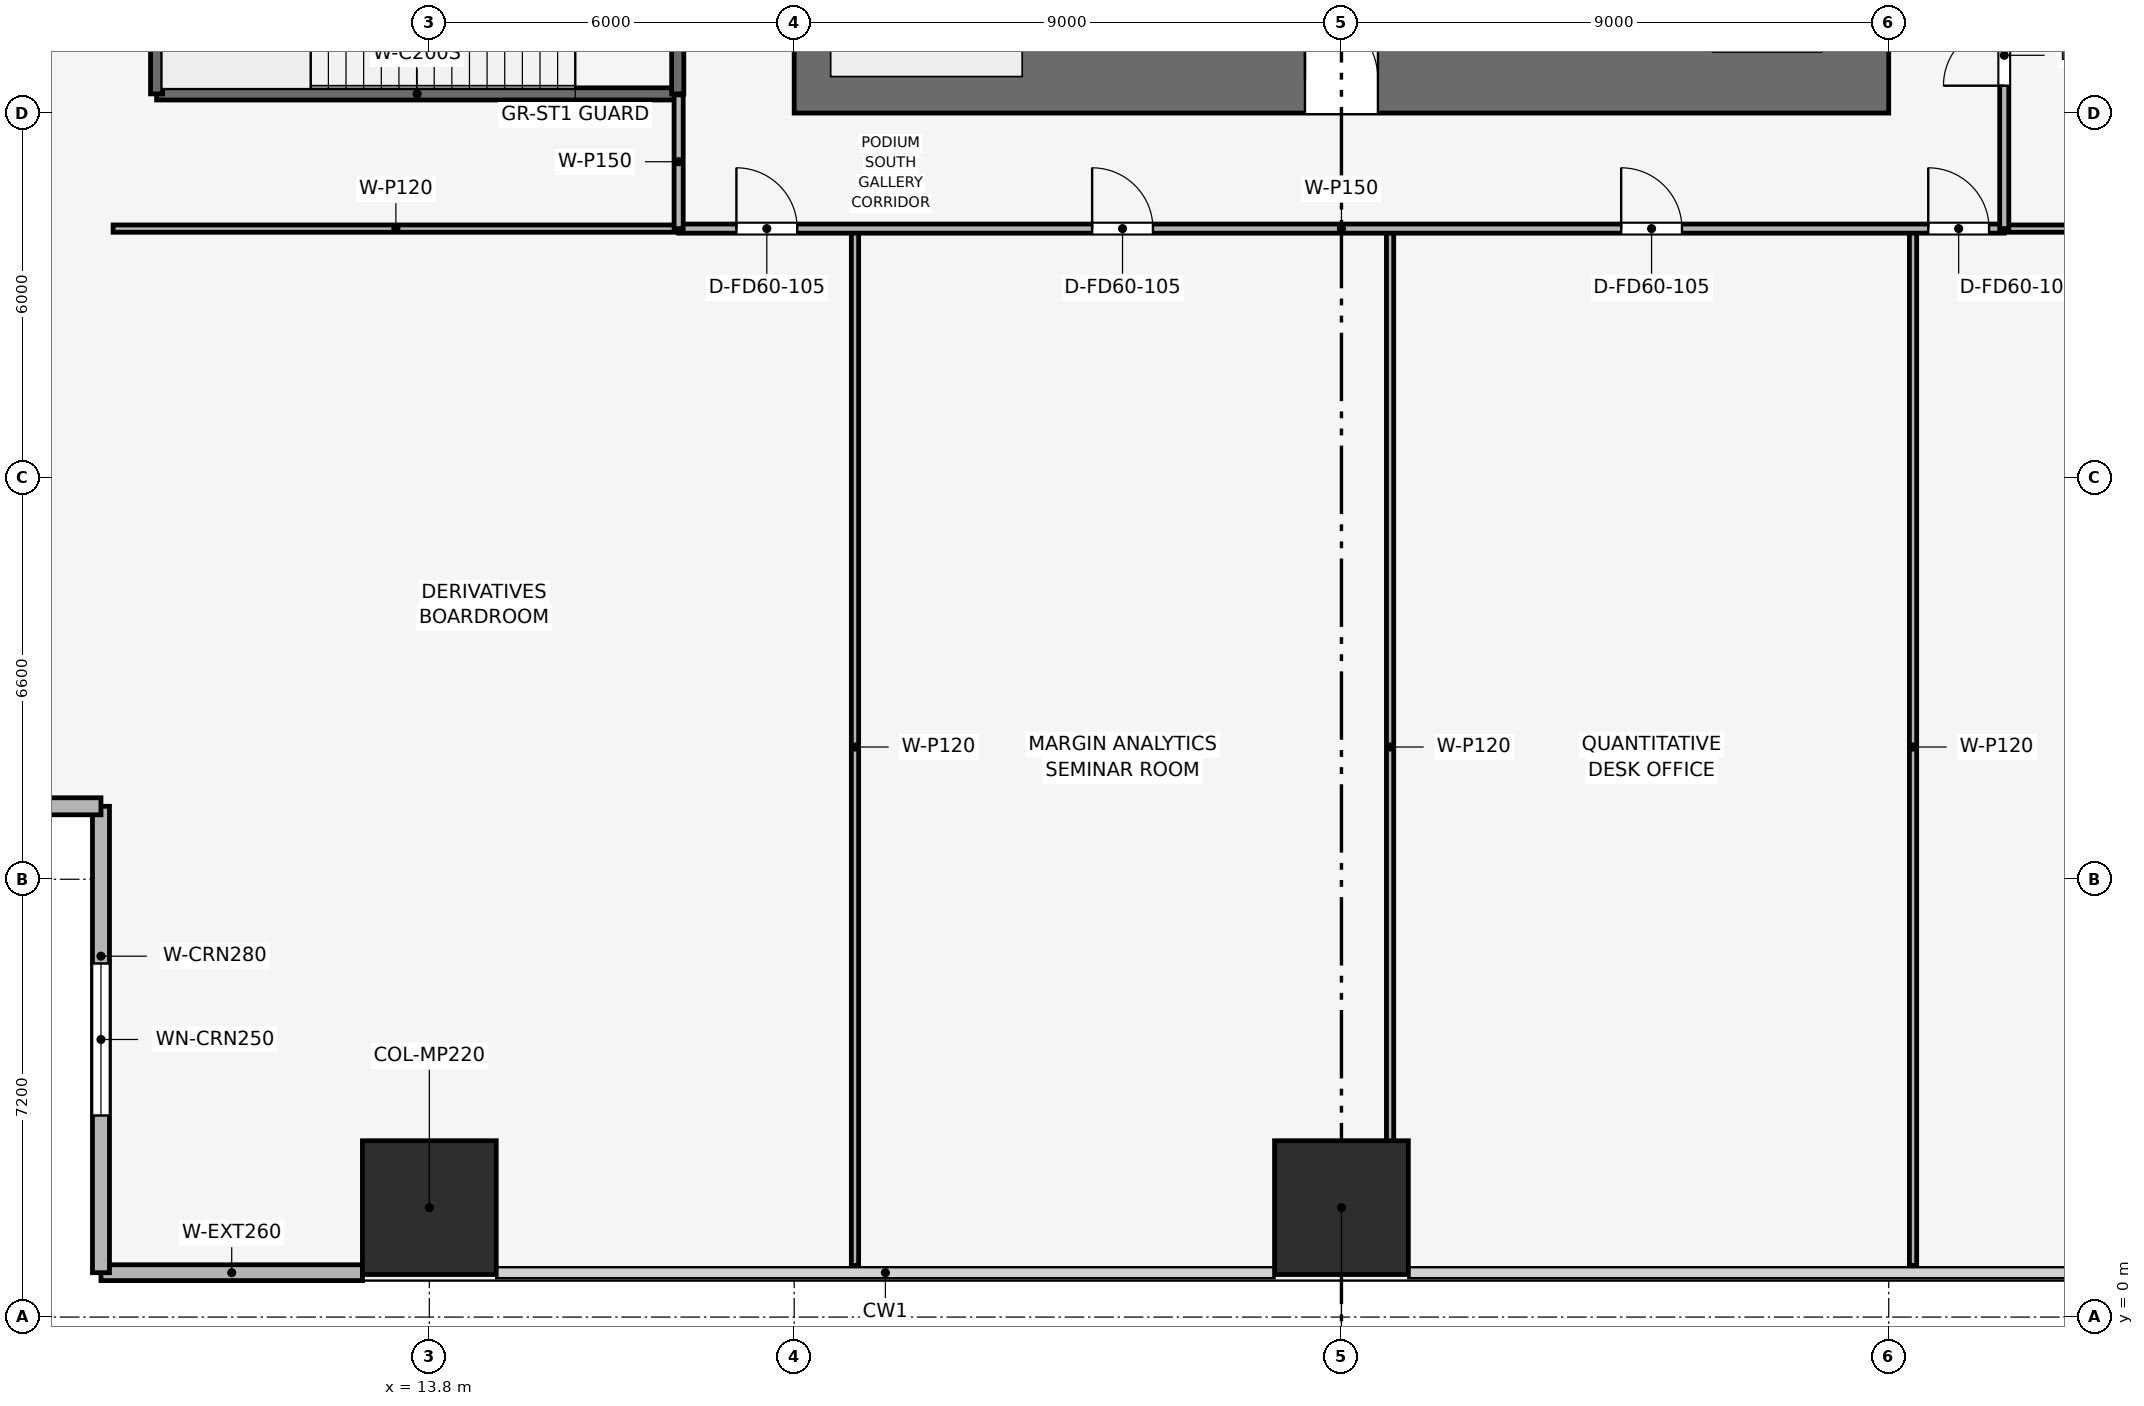
"""IFC4 building model, lengths in metres.
Left out: names, types, materials, properties, quantities, classifications, styles, units other than length and angle.
Written with IfcOpenShell. Run it as: python <this file> out.ifc"""

import sys

from ifc_helpers import new_model, si_unit, direction, frame, frame_2d, origin, origin_2d, place, context, subcontext, project, spatial, rectangle, extrude, element, fill, save


model = new_model("IFC4")
c1 = context("Model", 3, precision=1e-05, world=origin(), true_north=direction((0.0, 1.0)))
c2 = subcontext(c1, "Body", "Model", "MODEL_VIEW")
j1 = project(units=[si_unit("LENGTHUNIT", "METRE"), si_unit("PLANEANGLEUNIT", "RADIAN")], contexts=[c1])
p1 = place(None, origin())
s1 = spatial("IfcSite", under=j1, at=p1, CompositionType="ELEMENT")
p2 = place(p1, origin())
s2 = spatial("IfcBuilding", under=s1, at=p2, CompositionType="ELEMENT")
p3 = place(p2, frame((0.0, 0.0, 13.8)))
s3 = spatial("IfcBuildingStorey", under=s2, at=p3, CompositionType="ELEMENT", Elevation=13.8)
p4 = place(p3, frame((19.8, 20.35, 0.0), z_axis=(0.0, 0.0, 1.0), x_axis=(1.0, 0.0, 0.0)))
e1 = element("IfcWall", 1, at=p4, inside=s3, PredefinedType="SHEAR", context=c2, shape_type="SweptSolid", body=[
    extrude(rectangle(XDim=18.0, YDim=1.1, at=frame_2d((9.0, 0.0))), origin(), (0.0, 0.0, 1.0), 5.4),
])
p5 = place(p4, frame((8.4, 0.0, 0.0)))
e2 = element("IfcOpeningElement", 2, at=p5, cuts=e1, PredefinedType="OPENING", context=c2, shape_type="SweptSolid", body=[
    extrude(rectangle(XDim=1.2, YDim=2.2, at=frame_2d((0.6, 1.1))), frame((0.0, 0.56, 0.0), z_axis=(0.0, -1.0, 0.0), x_axis=(1.0, 0.0, 0.0)), (0.0, 0.0, 1.0), 1.12),
])
for number, where, z_axis, x_axis in (
    (3, (13.8, 1.8, 0.002), (0.0, 0.0, 1.0), (1.0, 0.0, 0.0)),
    (4, (28.8, 1.8, 0.002), (0.0, 0.0, 1.0), (1.0, 0.0, 0.0)),
):
    element("IfcColumn", number, at=place(p3, frame(where, z_axis=z_axis, x_axis=x_axis)), inside=s3, PredefinedType="PILASTER", context=c2, shape_type="SweptSolid", body=[
        extrude(rectangle(XDim=2.2, YDim=2.2, at=origin_2d()), origin(), (0.0, 0.0, 1.0), 5.396),
    ])
p6 = place(p3, frame((12.7, 0.73, 0.0), z_axis=(0.0, 0.0, 1.0), x_axis=(-1.0, 0.0, 0.0)))
e5 = element("IfcWall", 5, at=p6, inside=s3, PredefinedType="SOLIDWALL", context=c2, shape_type="SweptSolid", body=[
    extrude(rectangle(XDim=4.3, YDim=0.26, at=frame_2d((2.15, 0.0))), origin(), (0.0, 0.0, 1.0), 5.05),
])
p7 = place(p3, frame((8.4, 0.73, 0.0), z_axis=(0.0, 0.0, 1.0), x_axis=(0.0, 1.0, 0.0)))
e6 = element("IfcWall", 6, at=p7, inside=s3, PredefinedType="SOLIDWALL", context=c2, shape_type="SweptSolid", body=[
    extrude(rectangle(XDim=7.67, YDim=0.28, at=frame_2d((3.835, 0.0))), origin(), (0.0, 0.0, 1.0), 5.05),
])
p8 = place(p7, frame((2.585, 0.0, 0.9)))
e7 = element("IfcOpeningElement", 7, at=p8, cuts=e6, PredefinedType="OPENING", context=c2, shape_type="SweptSolid", body=[
    extrude(rectangle(XDim=2.5, YDim=1.9, at=frame_2d((1.25, 0.95))), frame((0.0, 0.15, 0.0), z_axis=(0.0, -1.0, 0.0), x_axis=(1.0, 0.0, 0.0)), (0.0, 0.0, 1.0), 0.3),
])
p9 = place(p3, frame((8.4, 8.4, 0.0), z_axis=(0.0, 0.0, 1.0), x_axis=(-1.0, 0.0, 0.0)))
e8 = element("IfcWall", 8, at=p9, inside=s3, PredefinedType="SOLIDWALL", context=c2, shape_type="SweptSolid", body=[
    extrude(rectangle(XDim=7.67, YDim=0.28, at=frame_2d((3.835, 0.0))), origin(), (0.0, 0.0, 1.0), 5.05),
])
p10 = place(p9, frame((2.585, 0.0, 0.9)))
e9 = element("IfcOpeningElement", 9, at=p10, cuts=e8, PredefinedType="OPENING", context=c2, shape_type="SweptSolid", body=[
    extrude(rectangle(XDim=2.5, YDim=1.9, at=frame_2d((1.25, 0.95))), frame((0.0, 0.15, 0.0), z_axis=(0.0, -1.0, 0.0), x_axis=(1.0, 0.0, 0.0)), (0.0, 0.0, 1.0), 0.3),
])
p11 = place(p3, frame((9.315, 20.115, 0.0), z_axis=(0.0, 0.0, 1.0), x_axis=(1.0, 0.0, 0.0)))
e10 = element("IfcWall", 10, at=p11, inside=s3, PredefinedType="SHEAR", context=c2, shape_type="SweptSolid", body=[
    extrude(rectangle(XDim=8.57, YDim=0.2, at=frame_2d((4.285, 0.0))), origin(), (0.0, 0.0, 1.0), 5.398),
])
p12 = place(p3, frame((9.315, 20.115, 0.0), z_axis=(0.0, 0.0, 1.0), x_axis=(0.0, 1.0, 0.0)))
e11 = element("IfcWall", 11, at=p12, inside=s3, PredefinedType="SHEAR", context=c2, shape_type="SweptSolid", body=[
    extrude(rectangle(XDim=3.32, YDim=0.2, at=frame_2d((1.66, 0.0))), origin(), (0.0, 0.0, 1.0), 5.398),
])
p13 = place(p3, frame((17.885, 20.115, 0.0), z_axis=(0.0, 0.0, 1.0), x_axis=(0.0, 1.0, 0.0)))
e12 = element("IfcWall", 12, at=p13, inside=s3, PredefinedType="SHEAR", context=c2, shape_type="SweptSolid", body=[
    extrude(rectangle(XDim=3.32, YDim=0.2, at=frame_2d((1.66, 0.0))), origin(), (0.0, 0.0, 1.0), 5.398),
])
p14 = place(p13, frame((0.9, 0.0, 0.0)))
e13 = element("IfcOpeningElement", 13, at=p14, cuts=e12, PredefinedType="OPENING", context=c2, shape_type="SweptSolid", body=[
    extrude(rectangle(XDim=1.1, YDim=2.15, at=frame_2d((0.55, 1.075))), frame((0.0, 0.11, 0.0), z_axis=(0.0, -1.0, 0.0), x_axis=(1.0, 0.0, 0.0)), (0.0, 0.0, 1.0), 0.22),
])
for number, where, z_axis, x_axis in (
    (14, (20.8, 0.85, 0.0), (0.0, 0.0, 1.0), (0.0, 1.0, 0.0)),
    (15, (29.6, 0.85, 0.0), (0.0, 0.0, 1.0), (0.0, 1.0, 0.0)),
    (16, (38.2, 0.85, 0.0), (0.0, 0.0, 1.0), (0.0, 1.0, 0.0)),
):
    element("IfcWall", number, at=place(p3, frame(where, z_axis=z_axis, x_axis=x_axis)), inside=s3, PredefinedType="PARTITIONING", context=c2, shape_type="SweptSolid", body=[
        extrude(rectangle(XDim=17.05, YDim=0.12, at=frame_2d((8.525, 0.0))), origin(), (0.0, 0.0, 1.0), 4.035),
    ])
p15 = place(p3, frame((8.6, 17.9, 0.0), z_axis=(0.0, 0.0, 1.0), x_axis=(1.0, 0.0, 0.0)))
e17 = element("IfcWall", 17, at=p15, inside=s3, PredefinedType="PARTITIONING", context=c2, shape_type="SweptSolid", body=[
    extrude(rectangle(XDim=9.3, YDim=0.12, at=frame_2d((4.65, 0.0))), origin(), (0.0, 0.0, 1.0), 5.05),
])
p16 = place(p3, frame((39.7, 17.9, 0.0), z_axis=(0.0, 0.0, 1.0), x_axis=(1.0, 0.0, 0.0)))
e18 = element("IfcWall", 18, at=p16, inside=s3, PredefinedType="PARTITIONING", context=c2, shape_type="SweptSolid", body=[
    extrude(rectangle(XDim=17.05, YDim=0.12, at=frame_2d((8.525, 0.0))), origin(), (0.0, 0.0, 1.0), 4.035),
])
p17 = place(p3, frame((17.9, 17.9, 0.0), z_axis=(0.0, 0.0, 1.0), x_axis=(1.0, 0.0, 0.0)))
e19 = element("IfcWall", 19, at=p17, inside=s3, PredefinedType="PARTITIONING", context=c2, shape_type="SweptSolid", body=[
    extrude(rectangle(XDim=21.8, YDim=0.15, at=frame_2d((10.9, 0.0))), origin(), (0.0, 0.0, 1.0), 4.135),
])
p18 = place(p17, frame((0.95, 0.0, 0.0)))
e20 = element("IfcOpeningElement", 20, at=p18, cuts=e19, PredefinedType="OPENING", context=c2, shape_type="SweptSolid", body=[
    extrude(rectangle(XDim=1.0, YDim=2.15, at=frame_2d((0.5, 1.075))), frame((0.0, 0.085, 0.0), z_axis=(0.0, -1.0, 0.0), x_axis=(1.0, 0.0, 0.0)), (0.0, 0.0, 1.0), 0.17),
])
p19 = place(p17, frame((6.8, 0.0, 0.0)))
e21 = element("IfcOpeningElement", 21, at=p19, cuts=e19, PredefinedType="OPENING", context=c2, shape_type="SweptSolid", body=[
    extrude(rectangle(XDim=1.0, YDim=2.15, at=frame_2d((0.5, 1.075))), frame((0.0, 0.085, 0.0), z_axis=(0.0, -1.0, 0.0), x_axis=(1.0, 0.0, 0.0)), (0.0, 0.0, 1.0), 0.17),
])
p20 = place(p17, frame((15.5, 0.0, 0.0)))
e22 = element("IfcOpeningElement", 22, at=p20, cuts=e19, PredefinedType="OPENING", context=c2, shape_type="SweptSolid", body=[
    extrude(rectangle(XDim=1.0, YDim=2.15, at=frame_2d((0.5, 1.075))), frame((0.0, 0.085, 0.0), z_axis=(0.0, -1.0, 0.0), x_axis=(1.0, 0.0, 0.0)), (0.0, 0.0, 1.0), 0.17),
])
p21 = place(p17, frame((20.55, 0.0, 0.0)))
e23 = element("IfcOpeningElement", 23, at=p21, cuts=e19, PredefinedType="OPENING", context=c2, shape_type="SweptSolid", body=[
    extrude(rectangle(XDim=1.0, YDim=2.15, at=frame_2d((0.5, 1.075))), frame((0.0, 0.085, 0.0), z_axis=(0.0, -1.0, 0.0), x_axis=(1.0, 0.0, 0.0)), (0.0, 0.0, 1.0), 0.17),
])
p22 = place(p3, frame((17.9, 17.9, 0.0), z_axis=(0.0, 0.0, 1.0), x_axis=(0.0, 1.0, 0.0)))
e24 = element("IfcWall", 24, at=p22, inside=s3, PredefinedType="PARTITIONING", context=c2, shape_type="SweptSolid", body=[
    extrude(rectangle(XDim=2.2, YDim=0.15, at=frame_2d((1.1, 0.0))), origin(), (0.0, 0.0, 1.0), 5.05),
])
p23 = place(p3, frame((39.7, 17.9, 0.0), z_axis=(0.0, 0.0, 1.0), x_axis=(0.0, 1.0, 0.0)))
e25 = element("IfcWall", 25, at=p23, inside=s3, PredefinedType="PARTITIONING", context=c2, shape_type="SweptSolid", body=[
    extrude(rectangle(XDim=16.25, YDim=0.15, at=frame_2d((8.125, 0.0))), origin(), (0.0, 0.0, 1.0), 4.135),
])
p24 = place(p23, frame((2.35, 0.0, 0.0)))
e26 = element("IfcOpeningElement", 26, at=p24, cuts=e25, PredefinedType="OPENING", context=c2, shape_type="SweptSolid", body=[
    extrude(rectangle(XDim=1.0, YDim=2.15, at=frame_2d((0.5, 1.075))), frame((0.0, 0.085, 0.0), z_axis=(0.0, -1.0, 0.0), x_axis=(1.0, 0.0, 0.0)), (0.0, 0.0, 1.0), 0.17),
])
p25 = place(p23, frame((8.3, 0.0, 0.0)))
e27 = element("IfcOpeningElement", 27, at=p25, cuts=e25, PredefinedType="OPENING", context=c2, shape_type="SweptSolid", body=[
    extrude(rectangle(XDim=1.0, YDim=2.15, at=frame_2d((0.5, 1.075))), frame((0.0, 0.085, 0.0), z_axis=(0.0, -1.0, 0.0), x_axis=(1.0, 0.0, 0.0)), (0.0, 0.0, 1.0), 0.17),
])
p26 = place(p23, frame((13.575, 0.0, 0.0)))
e28 = element("IfcOpeningElement", 28, at=p26, cuts=e25, PredefinedType="OPENING", context=c2, shape_type="SweptSolid", body=[
    extrude(rectangle(XDim=1.0, YDim=2.15, at=frame_2d((0.5, 1.075))), frame((0.0, 0.085, 0.0), z_axis=(0.0, -1.0, 0.0), x_axis=(1.0, 0.0, 0.0)), (0.0, 0.0, 1.0), 0.17),
])
p27 = place(p8, origin())
e29 = element("IfcWindow", 29, at=p27, inside=s3, PartitioningType="SINGLE_PANEL", PredefinedType="WINDOW", context=c2, shape_type="SweptSolid", body=[
    extrude(rectangle(XDim=2.5, YDim=1.9, at=frame_2d((1.25, 0.95))), frame((0.0, 0.03, 0.0), z_axis=(0.0, -1.0, 0.0), x_axis=(1.0, 0.0, 0.0)), (0.0, 0.0, 1.0), 0.06),
])
fill(e7, e29)
p28 = place(p18, origin())
e30 = element("IfcDoor", 30, at=p28, inside=s3, OperationType="SINGLE_SWING_LEFT", PredefinedType="DOOR", context=c2, shape_type="SweptSolid", body=[
    extrude(rectangle(XDim=1.0, YDim=2.15, at=frame_2d((0.5, 1.075))), frame((0.0, 0.025, 0.0), z_axis=(0.0, -1.0, 0.0), x_axis=(1.0, 0.0, 0.0)), (0.0, 0.0, 1.0), 0.05),
])
fill(e20, e30)
p29 = place(p19, origin())
e31 = element("IfcDoor", 31, at=p29, inside=s3, OperationType="SINGLE_SWING_LEFT", PredefinedType="DOOR", context=c2, shape_type="SweptSolid", body=[
    extrude(rectangle(XDim=1.0, YDim=2.15, at=frame_2d((0.5, 1.075))), frame((0.0, 0.025, 0.0), z_axis=(0.0, -1.0, 0.0), x_axis=(1.0, 0.0, 0.0)), (0.0, 0.0, 1.0), 0.05),
])
fill(e21, e31)
p30 = place(p20, origin())
e32 = element("IfcDoor", 32, at=p30, inside=s3, OperationType="SINGLE_SWING_LEFT", PredefinedType="DOOR", context=c2, shape_type="SweptSolid", body=[
    extrude(rectangle(XDim=1.0, YDim=2.15, at=frame_2d((0.5, 1.075))), frame((0.0, 0.025, 0.0), z_axis=(0.0, -1.0, 0.0), x_axis=(1.0, 0.0, 0.0)), (0.0, 0.0, 1.0), 0.05),
])
fill(e22, e32)
p31 = place(p21, origin())
e33 = element("IfcDoor", 33, at=p31, inside=s3, OperationType="SINGLE_SWING_LEFT", PredefinedType="DOOR", context=c2, shape_type="SweptSolid", body=[
    extrude(rectangle(XDim=1.0, YDim=2.15, at=frame_2d((0.5, 1.075))), frame((0.0, 0.025, 0.0), z_axis=(0.0, -1.0, 0.0), x_axis=(1.0, 0.0, 0.0)), (0.0, 0.0, 1.0), 0.05),
])
fill(e23, e33)
p32 = place(p24, origin())
e34 = element("IfcDoor", 34, at=p32, inside=s3, OperationType="SINGLE_SWING_LEFT", PredefinedType="DOOR", context=c2, shape_type="SweptSolid", body=[
    extrude(rectangle(XDim=1.0, YDim=2.15, at=frame_2d((0.5, 1.075))), frame((0.0, 0.025, 0.0), z_axis=(0.0, -1.0, 0.0), x_axis=(1.0, 0.0, 0.0)), (0.0, 0.0, 1.0), 0.05),
])
fill(e26, e34)
p33 = place(p5, origin())
e35 = element("IfcDoor", 35, at=p33, inside=s3, OperationType="SINGLE_SWING_LEFT", PredefinedType="DOOR", context=c2, shape_type="SweptSolid", body=[
    extrude(rectangle(XDim=1.2, YDim=2.2, at=frame_2d((0.6, 1.1))), frame((0.0, 0.025, 0.0), z_axis=(0.0, -1.0, 0.0), x_axis=(1.0, 0.0, 0.0)), (0.0, 0.0, 1.0), 0.05),
])
fill(e2, e35)
save(model, sys.argv[1])
